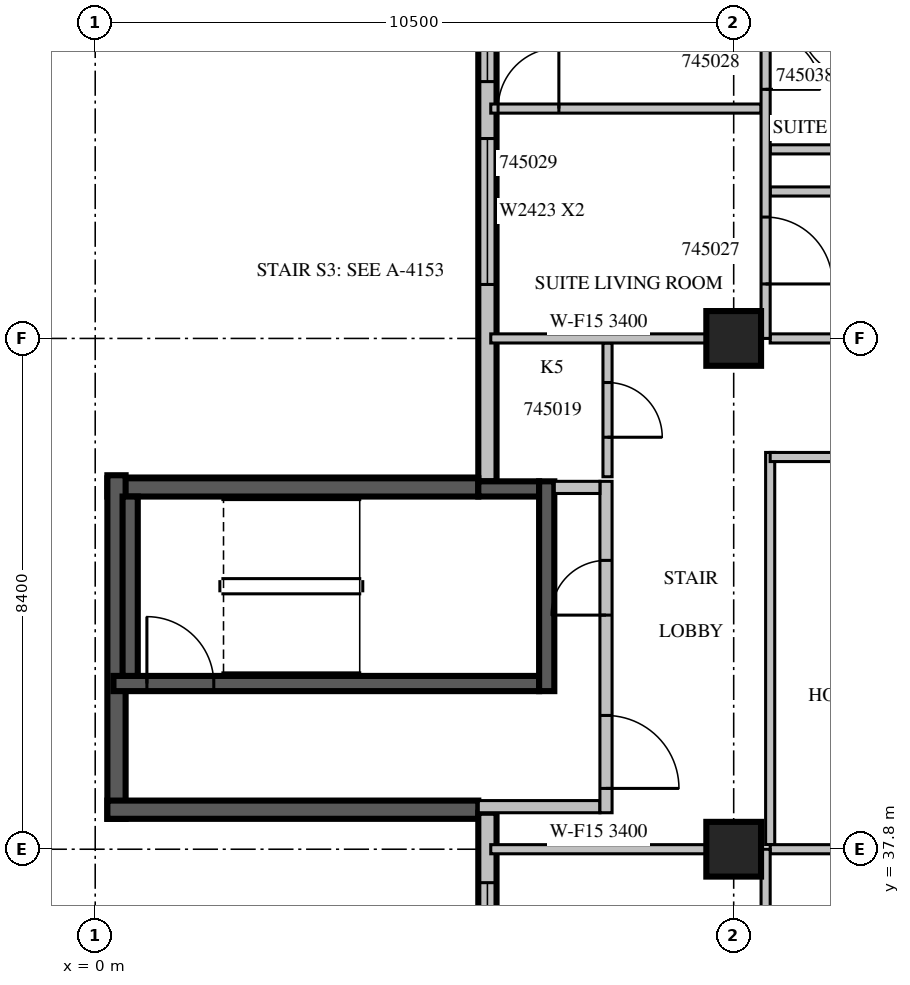
"""IFC4 building model, lengths in metres.
Left out: names, types, materials, properties, quantities, classifications, styles, units other than length and angle.
Written with IfcOpenShell. Run it as: python <this file> out.ifc"""

import sys

from ifc_helpers import new_model, si_unit, direction, frame, frame_2d, origin, origin_2d, place, context, subcontext, project, spatial, rectangle, extrude, source, transform, mapped, element, fill, save


model = new_model("IFC4")
c1 = context("Model", 3, precision=1e-05, world=origin(), true_north=direction((0.0, 1.0)))
c2 = subcontext(c1, "Body", "Model", "MODEL_VIEW")
j1 = project(units=[si_unit("LENGTHUNIT", "METRE"), si_unit("PLANEANGLEUNIT", "RADIAN")], contexts=[c1])
p1 = place(None, origin())
s1 = spatial("IfcSite", under=j1, at=p1, CompositionType="ELEMENT")
p2 = place(p1, origin())
s2 = spatial("IfcBuilding", under=s1, at=p2, CompositionType="ELEMENT")
p3 = place(p2, frame((0.0, 0.0, 204.4)))
s3 = spatial("IfcBuildingStorey", under=s2, at=p3, CompositionType="ELEMENT", Elevation=204.4)
m1 = source(origin(), c2, "Body", "SweptSolid", [
    extrude(rectangle(XDim=0.9, YDim=0.9, at=origin_2d()), origin(), (0.0, 0.0, 1.0), 3.8),
])
for number, where, z_axis, x_axis in (
    (1, (10.5, 37.8, 0.0), (0.0, 0.0, 1.0), (1.0, 0.0, 0.0)),
    (2, (10.5, 46.2, 0.0), (0.0, 0.0, 1.0), (1.0, 0.0, 0.0)),
):
    element("IfcColumn", number, at=place(p3, frame(where, z_axis=z_axis, x_axis=x_axis)), inside=s3, PredefinedType="COLUMN", context=c2, shape_type="MappedRepresentation", body=[
        mapped(m1, transform((0.0, 0.0, 0.0), scale=1.0)),
    ])
m2 = source(origin(), c2, "Body", "SweptSolid", [
    extrude(rectangle(XDim=9.91, YDim=0.3, at=frame_2d((4.955, 0.0))), origin(), (0.0, 0.0, 1.0), 3.4),
])
p4 = place(p3, frame((6.45, 53.76, 0.0), z_axis=(0.0, 0.0, 1.0), x_axis=(0.0, -1.0, 0.0)))
e3 = element("IfcWall", 3, at=p4, inside=s3, PredefinedType="STANDARD", context=c2, shape_type="MappedRepresentation", body=[
    mapped(m2, transform((0.0, 0.0, 0.0), scale=1.0)),
])
m3 = source(origin(), c2, "Body", "SweptSolid", [
    extrude(rectangle(XDim=2.4, YDim=2.3, at=frame_2d((1.2, 1.15))), frame((0.0, 0.16, 0.0), z_axis=(0.0, -1.0, 0.0), x_axis=(1.0, 0.0, 0.0)), (0.0, 0.0, 1.0), 0.32),
])
p5 = place(p4, frame((4.272, 0.0, 0.6)))
e4 = element("IfcOpeningElement", 4, at=p5, cuts=e3, PredefinedType="OPENING", context=c2, shape_type="MappedRepresentation", body=[
    mapped(m3, transform((0.0, 0.0, 0.0), scale=1.0)),
])
p6 = place(p4, frame((0.936, 0.0, 0.6)))
e5 = element("IfcOpeningElement", 5, at=p6, cuts=e3, PredefinedType="OPENING", context=c2, shape_type="MappedRepresentation", body=[
    mapped(m3, transform((0.0, 0.0, 0.0), scale=1.0)),
])
m4 = source(origin(), c2, "Body", "SweptSolid", [
    extrude(rectangle(XDim=6.1, YDim=0.3, at=frame_2d((3.05, 0.0))), origin(), (0.0, 0.0, 1.0), 3.4),
])
p7 = place(p3, frame((6.3, 43.75, 0.0), z_axis=(0.0, 0.0, 1.0), x_axis=(-1.0, 0.0, 0.0)))
e6 = element("IfcWall", 6, at=p7, inside=s3, PredefinedType="SOLIDWALL", context=c2, shape_type="MappedRepresentation", body=[
    mapped(m4, transform((0.0, 0.0, 0.0), scale=1.0)),
])
m5 = source(origin(), c2, "Body", "SweptSolid", [
    extrude(rectangle(XDim=5.65, YDim=0.3, at=frame_2d((2.825, 0.0))), origin(), (0.0, 0.0, 1.0), 3.4),
])
p8 = place(p3, frame((0.35, 43.95, 0.0), z_axis=(0.0, 0.0, 1.0), x_axis=(0.0, -1.0, 0.0)))
e7 = element("IfcWall", 7, at=p8, inside=s3, PredefinedType="SOLIDWALL", context=c2, shape_type="MappedRepresentation", body=[
    mapped(m5, transform((0.0, 0.0, 0.0), scale=1.0)),
])
p9 = place(p3, frame((0.2, 38.45, 0.0), z_axis=(0.0, 0.0, 1.0), x_axis=(1.0, 0.0, 0.0)))
e8 = element("IfcWall", 8, at=p9, inside=s3, PredefinedType="SOLIDWALL", context=c2, shape_type="MappedRepresentation", body=[
    mapped(m4, transform((0.0, 0.0, 0.0), scale=1.0)),
])
p10 = place(p3, frame((6.45, 38.4, 0.0), z_axis=(0.0, 0.0, 1.0), x_axis=(0.0, -1.0, 0.0)))
e9 = element("IfcWall", 9, at=p10, inside=s3, PredefinedType="STANDARD", context=c2, shape_type="SweptSolid", body=[
    extrude(rectangle(XDim=16.6, YDim=0.3, at=frame_2d((8.3, 0.0))), origin(), (0.0, 0.0, 1.0), 2.9),
])
m6 = source(origin(), c2, "Body", "SweptSolid", [
    extrude(rectangle(XDim=1.8, YDim=2.3, at=frame_2d((0.9, 1.15))), frame((0.0, 0.16, 0.0), z_axis=(0.0, -1.0, 0.0), x_axis=(1.0, 0.0, 0.0)), (0.0, 0.0, 1.0), 0.32),
])
p11 = place(p10, frame((1.15, 0.0, 0.6)))
e10 = element("IfcOpeningElement", 10, at=p11, cuts=e9, PredefinedType="OPENING", context=c2, shape_type="MappedRepresentation", body=[
    mapped(m6, transform((0.0, 0.0, 0.0), scale=1.0)),
])
p12 = place(p10, frame((5.162, 0.0, 0.6)))
e11 = element("IfcOpeningElement", 11, at=p12, cuts=e9, PredefinedType="OPENING", context=c2, shape_type="MappedRepresentation", body=[
    mapped(m6, transform((0.0, 0.0, 0.0), scale=1.0)),
])
p13 = place(p10, frame((9.438, 0.0, 0.6)))
e12 = element("IfcOpeningElement", 12, at=p13, cuts=e9, PredefinedType="OPENING", context=c2, shape_type="MappedRepresentation", body=[
    mapped(m6, transform((0.0, 0.0, 0.0), scale=1.0)),
])
m7 = source(origin(), c2, "Body", "SweptSolid", [
    extrude(rectangle(XDim=1.2, YDim=2.3, at=frame_2d((0.6, 1.15))), frame((0.0, 0.16, 0.0), z_axis=(0.0, -1.0, 0.0), x_axis=(1.0, 0.0, 0.0)), (0.0, 0.0, 1.0), 0.32),
])
p14 = place(p10, frame((14.338, 0.0, 0.6)))
e13 = element("IfcOpeningElement", 13, at=p14, cuts=e9, PredefinedType="OPENING", context=c2, shape_type="MappedRepresentation", body=[
    mapped(m7, transform((0.0, 0.0, 0.0), scale=1.0)),
])
p15 = place(p10, frame((11.887, 0.0, 0.6)))
e14 = element("IfcOpeningElement", 14, at=p15, cuts=e9, PredefinedType="OPENING", context=c2, shape_type="MappedRepresentation", body=[
    mapped(m6, transform((0.0, 0.0, 0.0), scale=1.0)),
])
m8 = source(origin(), c2, "Body", "SweptSolid", [
    extrude(rectangle(XDim=7.0, YDim=0.25, at=frame_2d((3.5, 0.0))), origin(), (0.0, 0.0, 1.0), 3.4),
])
p16 = place(p3, frame((0.3, 40.525, 0.0), z_axis=(0.0, 0.0, 1.0), x_axis=(1.0, 0.0, 0.0)))
e15 = element("IfcWall", 15, at=p16, inside=s3, PredefinedType="SOLIDWALL", context=c2, shape_type="MappedRepresentation", body=[
    mapped(m8, transform((0.0, 0.0, 0.0), scale=1.0)),
])
m9 = source(origin(), c2, "Body", "SweptSolid", [
    extrude(rectangle(XDim=1.1, YDim=2.1, at=frame_2d((0.55, 1.05))), frame((0.0, 0.135, 0.0), z_axis=(0.0, -1.0, 0.0), x_axis=(1.0, 0.0, 0.0)), (0.0, 0.0, 1.0), 0.27),
])
p17 = place(p16, frame((0.55, 0.0, 0.0)))
e16 = element("IfcOpeningElement", 16, at=p17, cuts=e15, PredefinedType="OPENING", context=c2, shape_type="MappedRepresentation", body=[
    mapped(m9, transform((0.0, 0.0, 0.0), scale=1.0)),
])
m10 = source(origin(), c2, "Body", "SweptSolid", [
    extrude(rectangle(XDim=1.0, YDim=0.25, at=frame_2d((0.5, 0.0))), origin(), (0.0, 0.0, 1.0), 3.4),
])
p18 = place(p3, frame((6.3, 43.725, 0.0), z_axis=(0.0, 0.0, 1.0), x_axis=(1.0, 0.0, 0.0)))
e17 = element("IfcWall", 17, at=p18, inside=s3, PredefinedType="SOLIDWALL", context=c2, shape_type="MappedRepresentation", body=[
    mapped(m10, transform((0.0, 0.0, 0.0), scale=1.0)),
])
m11 = source(origin(), c2, "Body", "SweptSolid", [
    extrude(rectangle(XDim=3.45, YDim=0.25, at=frame_2d((1.725, 0.0))), origin(), (0.0, 0.0, 1.0), 3.4),
])
p19 = place(p3, frame((7.425, 40.4, 0.0), z_axis=(0.0, 0.0, 1.0), x_axis=(0.0, 1.0, 0.0)))
e18 = element("IfcWall", 18, at=p19, inside=s3, PredefinedType="SOLIDWALL", context=c2, shape_type="MappedRepresentation", body=[
    mapped(m11, transform((0.0, 0.0, 0.0), scale=1.0)),
])
m12 = source(origin(), c2, "Body", "SweptSolid", [
    extrude(rectangle(XDim=2.95, YDim=0.25, at=frame_2d((1.475, 0.0))), origin(), (0.0, 0.0, 1.0), 3.4),
])
p20 = place(p3, frame((0.575, 40.65, 0.0), z_axis=(0.0, 0.0, 1.0), x_axis=(0.0, 1.0, 0.0)))
e19 = element("IfcWall", 19, at=p20, inside=s3, PredefinedType="SOLIDWALL", context=c2, shape_type="MappedRepresentation", body=[
    mapped(m12, transform((0.0, 0.0, 0.0), scale=1.0)),
])
m13 = source(origin(), c2, "Body", "SweptSolid", [
    extrude(rectangle(XDim=2.0, YDim=0.2, at=frame_2d((1.0, 0.0))), origin(), (0.0, 0.0, 1.0), 3.4),
])
p21 = place(p3, frame((6.3, 38.5, 0.0), z_axis=(0.0, 0.0, 1.0), x_axis=(1.0, 0.0, 0.0)))
e20 = element("IfcWall", 20, at=p21, inside=s3, PredefinedType="PARTITIONING", context=c2, shape_type="MappedRepresentation", body=[
    mapped(m13, transform((0.0, 0.0, 0.0), scale=1.0)),
])
m14 = source(origin(), c2, "Body", "SweptSolid", [
    extrude(rectangle(XDim=5.45, YDim=0.2, at=frame_2d((2.725, 0.0))), origin(), (0.0, 0.0, 1.0), 3.4),
])
p22 = place(p3, frame((8.4, 38.4, 0.0), z_axis=(0.0, 0.0, 1.0), x_axis=(0.0, 1.0, 0.0)))
e21 = element("IfcWall", 21, at=p22, inside=s3, PredefinedType="PARTITIONING", context=c2, shape_type="MappedRepresentation", body=[
    mapped(m14, transform((0.0, 0.0, 0.0), scale=1.0)),
])
m15 = source(origin(), c2, "Body", "SweptSolid", [
    extrude(rectangle(XDim=1.2, YDim=2.1, at=frame_2d((0.6, 1.05))), frame((0.0, 0.11, 0.0), z_axis=(0.0, -1.0, 0.0), x_axis=(1.0, 0.0, 0.0)), (0.0, 0.0, 1.0), 0.22),
])
p23 = place(p22, frame((0.4, 0.0, 0.0)))
e22 = element("IfcOpeningElement", 22, at=p23, cuts=e21, PredefinedType="OPENING", context=c2, shape_type="MappedRepresentation", body=[
    mapped(m15, transform((0.0, 0.0, 0.0), scale=1.0)),
])
m16 = source(origin(), c2, "Body", "SweptSolid", [
    extrude(rectangle(XDim=0.9, YDim=2.1, at=frame_2d((0.45, 1.05))), frame((0.0, 0.11, 0.0), z_axis=(0.0, -1.0, 0.0), x_axis=(1.0, 0.0, 0.0)), (0.0, 0.0, 1.0), 0.22),
])
p24 = place(p22, frame((3.25, 0.0, 0.0)))
e23 = element("IfcOpeningElement", 23, at=p24, cuts=e21, PredefinedType="OPENING", context=c2, shape_type="MappedRepresentation", body=[
    mapped(m16, transform((0.0, 0.0, 0.0), scale=1.0)),
])
m17 = source(origin(), c2, "Body", "SweptSolid", [
    extrude(rectangle(XDim=0.75, YDim=0.2, at=frame_2d((0.375, 0.0))), origin(), (0.0, 0.0, 1.0), 3.4),
])
p25 = place(p3, frame((7.55, 43.75, 0.0), z_axis=(0.0, 0.0, 1.0), x_axis=(1.0, 0.0, 0.0)))
e24 = element("IfcWall", 24, at=p25, inside=s3, PredefinedType="PARTITIONING", context=c2, shape_type="MappedRepresentation", body=[
    mapped(m17, transform((0.0, 0.0, 0.0), scale=1.0)),
])
m18 = source(origin(), c2, "Body", "SweptSolid", [
    extrude(rectangle(XDim=6.45, YDim=0.15, at=frame_2d((3.225, 0.0))), origin(), (0.0, 0.0, 1.0), 3.4),
])
p26 = place(p3, frame((11.1, 44.325, 0.0), z_axis=(0.0, 0.0, 1.0), x_axis=(0.0, -1.0, 0.0)))
e25 = element("IfcWall", 25, at=p26, inside=s3, PredefinedType="PARTITIONING", context=c2, shape_type="MappedRepresentation", body=[
    mapped(m18, transform((0.0, 0.0, 0.0), scale=1.0)),
])
m19 = source(origin(), c2, "Body", "SweptSolid", [
    extrude(rectangle(XDim=3.975, YDim=0.15, at=frame_2d((1.988, 0.0))), origin(), (0.0, 0.0, 1.0), 3.4),
])
p27 = place(p3, frame((15.075, 44.25, 0.0), z_axis=(0.0, 0.0, 1.0), x_axis=(-1.0, 0.0, 0.0)))
e26 = element("IfcWall", 26, at=p27, inside=s3, PredefinedType="PARTITIONING", context=c2, shape_type="MappedRepresentation", body=[
    mapped(m19, transform((0.0, 0.0, 0.0), scale=1.0)),
])
m20 = source(origin(), c2, "Body", "SweptSolid", [
    extrude(rectangle(XDim=2.2, YDim=0.15, at=frame_2d((1.1, 0.0))), origin(), (0.0, 0.0, 1.0), 3.4),
])
p28 = place(p3, frame((8.425, 43.925, 0.0), z_axis=(0.0, 0.0, 1.0), x_axis=(0.0, 1.0, 0.0)))
e27 = element("IfcWall", 27, at=p28, inside=s3, PredefinedType="PARTITIONING", context=c2, shape_type="MappedRepresentation", body=[
    mapped(m20, transform((0.0, 0.0, 0.0), scale=1.0)),
])
m21 = source(origin(), c2, "Body", "SweptSolid", [
    extrude(rectangle(XDim=0.9, YDim=2.1, at=frame_2d((0.45, 1.05))), frame((0.0, 0.085, 0.0), z_axis=(0.0, -1.0, 0.0), x_axis=(1.0, 0.0, 0.0)), (0.0, 0.0, 1.0), 0.17),
])
p29 = place(p28, frame((0.65, 0.0, 0.0)))
e28 = element("IfcOpeningElement", 28, at=p29, cuts=e27, PredefinedType="OPENING", context=c2, shape_type="MappedRepresentation", body=[
    mapped(m21, transform((0.0, 0.0, 0.0), scale=1.0)),
])
m22 = source(origin(), c2, "Body", "SweptSolid", [
    extrude(rectangle(XDim=3.546, YDim=0.15, at=frame_2d((1.773, 0.0))), origin(), (0.0, 0.0, 1.0), 3.4),
])
p30 = place(p3, frame((10.051, 37.8, 0.0), z_axis=(0.0, 0.0, 1.0), x_axis=(-1.0, 0.0, 0.0)))
e29 = element("IfcWall", 29, at=p30, inside=s3, PredefinedType="PARTITIONING", context=c2, shape_type="MappedRepresentation", body=[
    mapped(m22, transform((0.0, 0.0, 0.0), scale=1.0)),
])
m23 = source(origin(), c2, "Body", "SweptSolid", [
    extrude(rectangle(XDim=3.9, YDim=0.15, at=frame_2d((1.95, 0.0))), origin(), (0.0, 0.0, 1.0), 3.4),
])
p31 = place(p3, frame((15.0, 37.8, 0.0), z_axis=(0.0, 0.0, 1.0), x_axis=(-1.0, 0.0, 0.0)))
e30 = element("IfcWall", 30, at=p31, inside=s3, PredefinedType="PARTITIONING", context=c2, shape_type="MappedRepresentation", body=[
    mapped(m23, transform((0.0, 0.0, 0.0), scale=1.0)),
])
m24 = source(origin(), c2, "Body", "SweptSolid", [
    extrude(rectangle(XDim=8.4, YDim=0.15, at=frame_2d((4.2, 0.0))), origin(), (0.0, 0.0, 1.0), 2.9),
])
p32 = place(p3, frame((11.025, 29.4, 0.0), z_axis=(0.0, 0.0, 1.0), x_axis=(0.0, 1.0, 0.0)))
e31 = element("IfcWall", 31, at=p32, inside=s3, PredefinedType="PARTITIONING", context=c2, shape_type="MappedRepresentation", body=[
    mapped(m24, transform((0.0, 0.0, 0.0), scale=1.0)),
])
p33 = place(p32, frame((1.418, 0.0, 0.0)))
e32 = element("IfcOpeningElement", 32, at=p33, cuts=e31, PredefinedType="OPENING", context=c2, shape_type="MappedRepresentation", body=[
    mapped(m21, transform((0.0, 0.0, 0.0), scale=1.0)),
])
p34 = place(p32, frame((0.46, 0.0, 0.0)))
e33 = element("IfcOpeningElement", 33, at=p34, cuts=e31, PredefinedType="OPENING", context=c2, shape_type="MappedRepresentation", body=[
    mapped(m21, transform((0.0, 0.0, 0.0), scale=1.0)),
])
p35 = place(p32, frame((4.525, 0.0, 0.0)))
e34 = element("IfcOpeningElement", 34, at=p35, cuts=e31, PredefinedType="OPENING", context=c2, shape_type="MappedRepresentation", body=[
    mapped(m21, transform((0.0, 0.0, 0.0), scale=1.0)),
])
p36 = place(p32, frame((6.387, 0.0, 0.0)))
e35 = element("IfcOpeningElement", 35, at=p36, cuts=e31, PredefinedType="OPENING", context=c2, shape_type="MappedRepresentation", body=[
    mapped(m21, transform((0.0, 0.0, 0.0), scale=1.0)),
])
m25 = source(origin(), c2, "Body", "SweptSolid", [
    extrude(rectangle(XDim=4.445, YDim=0.15, at=frame_2d((2.223, 0.0))), origin(), (0.0, 0.0, 1.0), 3.4),
])
p37 = place(p3, frame((10.95, 49.98, 0.0), z_axis=(0.0, 0.0, 1.0), x_axis=(-1.0, 0.0, 0.0)))
e36 = element("IfcWall", 36, at=p37, inside=s3, PredefinedType="PARTITIONING", context=c2, shape_type="MappedRepresentation", body=[
    mapped(m25, transform((0.0, 0.0, 0.0), scale=1.0)),
])
m26 = source(origin(), c2, "Body", "SweptSolid", [
    extrude(rectangle(XDim=1.0, YDim=2.1, at=frame_2d((0.5, 1.05))), frame((0.0, 0.085, 0.0), z_axis=(0.0, -1.0, 0.0), x_axis=(1.0, 0.0, 0.0)), (0.0, 0.0, 1.0), 0.17),
])
p38 = place(p37, frame((3.325, 0.0, 0.0)))
e37 = element("IfcOpeningElement", 37, at=p38, cuts=e36, PredefinedType="OPENING", context=c2, shape_type="MappedRepresentation", body=[
    mapped(m26, transform((0.0, 0.0, 0.0), scale=1.0)),
])
for number, where, z_axis, x_axis in (
    (38, (15.0, 48.617, 0.0), (0.0, 0.0, 1.0), (-1.0, 0.0, 0.0)),
    (39, (15.0, 49.309, 0.0), (0.0, 0.0, 1.0), (-1.0, 0.0, 0.0)),
):
    element("IfcWall", number, at=place(p3, frame(where, z_axis=z_axis, x_axis=x_axis)), inside=s3, PredefinedType="PARTITIONING", context=c2, shape_type="MappedRepresentation", body=[
        mapped(m23, transform((0.0, 0.0, 0.0), scale=1.0)),
    ])
p39 = place(p3, frame((10.051, 46.2, 0.0), z_axis=(0.0, 0.0, 1.0), x_axis=(-1.0, 0.0, 0.0)))
e40 = element("IfcWall", 40, at=p39, inside=s3, PredefinedType="PARTITIONING", context=c2, shape_type="MappedRepresentation", body=[
    mapped(m22, transform((0.0, 0.0, 0.0), scale=1.0)),
])
p40 = place(p3, frame((15.0, 46.2, 0.0), z_axis=(0.0, 0.0, 1.0), x_axis=(-1.0, 0.0, 0.0)))
e41 = element("IfcWall", 41, at=p40, inside=s3, PredefinedType="PARTITIONING", context=c2, shape_type="MappedRepresentation", body=[
    mapped(m23, transform((0.0, 0.0, 0.0), scale=1.0)),
])
m27 = source(origin(), c2, "Body", "SweptSolid", [
    extrude(rectangle(XDim=7.26, YDim=0.15, at=frame_2d((3.63, 0.0))), origin(), (0.0, 0.0, 1.0), 3.4),
])
p41 = place(p3, frame((11.025, 46.2, 0.0), z_axis=(0.0, 0.0, 1.0), x_axis=(0.0, 1.0, 0.0)))
e42 = element("IfcWall", 42, at=p41, inside=s3, PredefinedType="PARTITIONING", context=c2, shape_type="MappedRepresentation", body=[
    mapped(m27, transform((0.0, 0.0, 0.0), scale=1.0)),
])
m28 = source(origin(), c2, "Body", "SweptSolid", [
    extrude(rectangle(XDim=1.1, YDim=2.1, at=frame_2d((0.55, 1.05))), frame((0.0, 0.085, 0.0), z_axis=(0.0, -1.0, 0.0), x_axis=(1.0, 0.0, 0.0)), (0.0, 0.0, 1.0), 0.17),
])
p42 = place(p41, frame((0.896, 0.0, 0.0)))
e43 = element("IfcOpeningElement", 43, at=p42, cuts=e42, PredefinedType="OPENING", context=c2, shape_type="MappedRepresentation", body=[
    mapped(m28, transform((0.0, 0.0, 0.0), scale=1.0)),
])
p43 = place(p41, frame((4.096, 0.0, 0.0)))
e44 = element("IfcOpeningElement", 44, at=p43, cuts=e42, PredefinedType="OPENING", context=c2, shape_type="MappedRepresentation", body=[
    mapped(m21, transform((0.0, 0.0, 0.0), scale=1.0)),
])
m29 = source(origin(), c2, "Body", "SweptSolid", [
    extrude(rectangle(XDim=2.4, YDim=2.3, at=frame_2d((1.2, 1.15))), frame((0.0, 0.03, 0.0), z_axis=(0.0, -1.0, 0.0), x_axis=(1.0, 0.0, 0.0)), (0.0, 0.0, 1.0), 0.06),
])
p44 = place(p5, origin())
e45 = element("IfcWindow", 45, at=p44, inside=s3, PartitioningType="SINGLE_PANEL", PredefinedType="WINDOW", context=c2, shape_type="MappedRepresentation", body=[
    mapped(m29, transform((0.0, 0.0, 0.0), scale=1.0)),
])
fill(e4, e45)
p45 = place(p6, origin())
e46 = element("IfcWindow", 46, at=p45, inside=s3, PartitioningType="SINGLE_PANEL", PredefinedType="WINDOW", context=c2, shape_type="MappedRepresentation", body=[
    mapped(m29, transform((0.0, 0.0, 0.0), scale=1.0)),
])
fill(e5, e46)
m30 = source(origin(), c2, "Body", "SweptSolid", [
    extrude(rectangle(XDim=1.8, YDim=2.3, at=frame_2d((0.9, 1.15))), frame((0.0, 0.03, 0.0), z_axis=(0.0, -1.0, 0.0), x_axis=(1.0, 0.0, 0.0)), (0.0, 0.0, 1.0), 0.06),
])
p46 = place(p11, origin())
e47 = element("IfcWindow", 47, at=p46, inside=s3, PartitioningType="SINGLE_PANEL", PredefinedType="WINDOW", context=c2, shape_type="MappedRepresentation", body=[
    mapped(m30, transform((0.0, 0.0, 0.0), scale=1.0)),
])
fill(e10, e47)
m31 = source(origin(), c2, "Body", "SweptSolid", [
    extrude(rectangle(XDim=1.1, YDim=2.1, at=frame_2d((0.55, 1.05))), frame((0.0, 0.025, 0.0), z_axis=(0.0, -1.0, 0.0), x_axis=(1.0, 0.0, 0.0)), (0.0, 0.0, 1.0), 0.05),
])
p47 = place(p17, origin())
e48 = element("IfcDoor", 48, at=p47, inside=s3, OperationType="SINGLE_SWING_LEFT", PredefinedType="DOOR", context=c2, shape_type="MappedRepresentation", body=[
    mapped(m31, transform((0.0, 0.0, 0.0), scale=1.0)),
])
fill(e16, e48)
m32 = source(origin(), c2, "Body", "SweptSolid", [
    extrude(rectangle(XDim=1.2, YDim=2.1, at=frame_2d((0.6, 1.05))), frame((0.0, 0.025, 0.0), z_axis=(0.0, -1.0, 0.0), x_axis=(1.0, 0.0, 0.0)), (0.0, 0.0, 1.0), 0.05),
])
p48 = place(p23, origin())
e49 = element("IfcDoor", 49, at=p48, inside=s3, OperationType="SINGLE_SWING_RIGHT", PredefinedType="DOOR", context=c2, shape_type="MappedRepresentation", body=[
    mapped(m32, transform((0.0, 0.0, 0.0), scale=1.0)),
])
fill(e22, e49)
m33 = source(origin(), c2, "Body", "SweptSolid", [
    extrude(rectangle(XDim=0.9, YDim=2.1, at=frame_2d((0.45, 1.05))), frame((0.0, 0.025, 0.0), z_axis=(0.0, -1.0, 0.0), x_axis=(1.0, 0.0, 0.0)), (0.0, 0.0, 1.0), 0.05),
])
p49 = place(p24, origin())
e50 = element("IfcDoor", 50, at=p49, inside=s3, OperationType="SINGLE_SWING_LEFT", PredefinedType="DOOR", context=c2, shape_type="MappedRepresentation", body=[
    mapped(m33, transform((0.0, 0.0, 0.0), scale=1.0)),
])
fill(e23, e50)
p50 = place(p29, origin())
e51 = element("IfcDoor", 51, at=p50, inside=s3, OperationType="SINGLE_SWING_RIGHT", PredefinedType="DOOR", context=c2, shape_type="MappedRepresentation", body=[
    mapped(m33, transform((0.0, 0.0, 0.0), scale=1.0)),
])
fill(e28, e51)
p51 = place(p42, origin())
e52 = element("IfcDoor", 52, at=p51, inside=s3, OperationType="SINGLE_SWING_RIGHT", PredefinedType="DOOR", context=c2, shape_type="MappedRepresentation", body=[
    mapped(m31, transform((0.0, 0.0, 0.0), scale=1.0)),
])
fill(e43, e52)
p52 = place(p43, origin())
e53 = element("IfcDoor", 53, at=p52, inside=s3, OperationType="SINGLE_SWING_RIGHT", PredefinedType="DOOR", context=c2, shape_type="MappedRepresentation", body=[
    mapped(m33, transform((0.0, 0.0, 0.0), scale=1.0)),
])
fill(e44, e53)
m34 = source(origin(), c2, "Body", "SweptSolid", [
    extrude(rectangle(XDim=1.0, YDim=2.1, at=frame_2d((0.5, 1.05))), frame((0.0, 0.025, 0.0), z_axis=(0.0, -1.0, 0.0), x_axis=(1.0, 0.0, 0.0)), (0.0, 0.0, 1.0), 0.05),
])
p53 = place(p38, origin())
e54 = element("IfcDoor", 54, at=p53, inside=s3, OperationType="SINGLE_SWING_RIGHT", PredefinedType="DOOR", context=c2, shape_type="MappedRepresentation", body=[
    mapped(m34, transform((0.0, 0.0, 0.0), scale=1.0)),
])
fill(e37, e54)
save(model, sys.argv[1])
